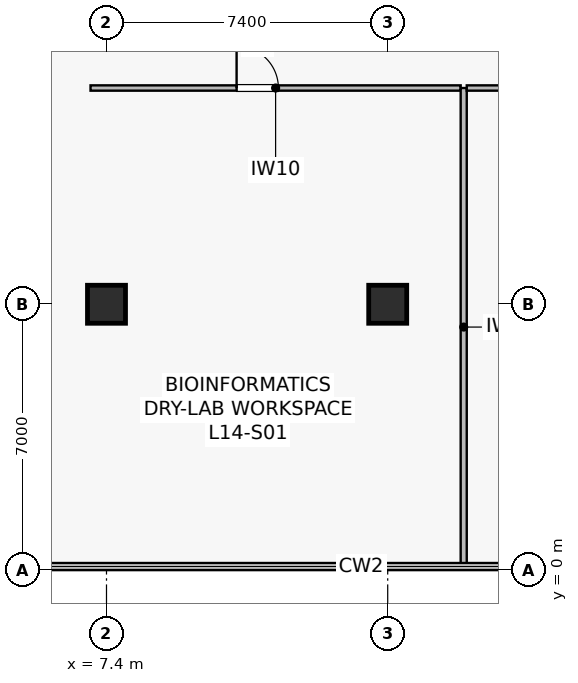
"""IFC4 building model, lengths in metres.
Left out: names, types, materials, properties, quantities, classifications, styles, units other than length and angle.
Written with IfcOpenShell. Run it as: python <this file> out.ifc"""

import sys

from ifc_helpers import new_model, si_unit, direction, frame, frame_2d, origin, origin_2d, place, context, subcontext, project, spatial, rectangle, extrude, source, transform, mapped, element, fill, save


model = new_model("IFC4")
c1 = context("Model", 3, precision=1e-05, world=origin(), true_north=direction((0.0, 1.0)))
c2 = subcontext(c1, "Body", "Model", "MODEL_VIEW")
j1 = project(units=[si_unit("LENGTHUNIT", "METRE"), si_unit("PLANEANGLEUNIT", "RADIAN")], contexts=[c1])
p1 = place(None, origin())
s1 = spatial("IfcSite", under=j1, at=p1, CompositionType="ELEMENT")
p2 = place(p1, origin())
s2 = spatial("IfcBuilding", under=s1, at=p2, CompositionType="ELEMENT")
p3 = place(p2, frame((0.0, 0.0, 58.0)))
s3 = spatial("IfcBuildingStorey", under=s2, at=p3, CompositionType="ELEMENT", Elevation=58.0)
m1 = source(origin(), c2, "Body", "SweptSolid", [
    extrude(rectangle(XDim=1.0, YDim=1.0, at=origin_2d()), origin(), (0.0, 0.0, 1.0), 4.1),
])
for number, where, z_axis, x_axis in (
    (1, (14.8, 7.0, 0.0), (0.0, 0.0, 1.0), (1.0, 0.0, 0.0)),
    (2, (7.4, 7.0, 0.0), (0.0, 0.0, 1.0), (1.0, 0.0, 0.0)),
):
    element("IfcColumn", number, at=place(p3, frame(where, z_axis=z_axis, x_axis=x_axis)), inside=s3, PredefinedType="COLUMN", context=c2, shape_type="MappedRepresentation", body=[
        mapped(m1, transform((0.0, 0.0, 0.0), scale=1.0)),
    ])
p4 = place(p3, frame((6.98, 12.69, 0.0), z_axis=(0.0, 0.0, 1.0), x_axis=(1.0, 0.0, 0.0)))
e3 = element("IfcWall", 3, at=p4, inside=s3, PredefinedType="PARTITIONING", context=c2, shape_type="SweptSolid", body=[
    extrude(rectangle(XDim=9.74, YDim=0.14, at=frame_2d((4.87, 0.0))), origin(), (0.0, 0.0, 1.0), 3.065),
])
p5 = place(p4, frame((3.844, 0.0, 0.0)))
e4 = element("IfcOpeningElement", 4, at=p5, cuts=e3, PredefinedType="OPENING", context=c2, shape_type="SweptSolid", body=[
    extrude(rectangle(XDim=1.1, YDim=2.18, at=frame_2d((0.55, 1.09))), frame((0.0, 0.08, 0.0), z_axis=(0.0, -1.0, 0.0), x_axis=(1.0, 0.0, 0.0)), (0.0, 0.0, 1.0), 0.16),
])
p6 = place(p3, frame((16.8, 0.11, 0.0), z_axis=(0.0, 0.0, 1.0), x_axis=(0.0, 1.0, 0.0)))
e5 = element("IfcWall", 5, at=p6, inside=s3, PredefinedType="PARTITIONING", context=c2, shape_type="SweptSolid", body=[
    extrude(rectangle(XDim=12.58, YDim=0.16, at=frame_2d((6.29, 0.0))), origin(), (0.0, 0.0, 1.0), 3.015),
])
p7 = place(p3, frame((16.88, 12.69, 0.0), z_axis=(0.0, 0.0, 1.0), x_axis=(1.0, 0.0, 0.0)))
e6 = element("IfcWall", 6, at=p7, inside=s3, PredefinedType="PARTITIONING", context=c2, shape_type="SweptSolid", body=[
    extrude(rectangle(XDim=13.24, YDim=0.14, at=frame_2d((6.62, 0.0))), origin(), (0.0, 0.0, 1.0), 3.065),
])
p8 = place(p7, frame((6.756, 0.0, 0.0)))
e7 = element("IfcOpeningElement", 7, at=p8, cuts=e6, PredefinedType="OPENING", context=c2, shape_type="SweptSolid", body=[
    extrude(rectangle(XDim=1.1, YDim=2.18, at=frame_2d((0.55, 1.09))), frame((0.0, 0.08, 0.0), z_axis=(0.0, -1.0, 0.0), x_axis=(1.0, 0.0, 0.0)), (0.0, 0.0, 1.0), 0.16),
])
m2 = source(origin(), c2, "Body", "SweptSolid", [
    extrude(rectangle(XDim=1.1, YDim=2.18, at=frame_2d((0.55, 1.09))), frame((0.0, 0.025, 0.0), z_axis=(0.0, -1.0, 0.0), x_axis=(1.0, 0.0, 0.0)), (0.0, 0.0, 1.0), 0.05),
])
p9 = place(p5, origin())
e8 = element("IfcDoor", 8, at=p9, inside=s3, OperationType="SINGLE_SWING_LEFT", PredefinedType="DOOR", context=c2, shape_type="MappedRepresentation", body=[
    mapped(m2, transform((0.0, 0.0, 0.0), scale=1.0)),
])
fill(e4, e8)
save(model, sys.argv[1])
